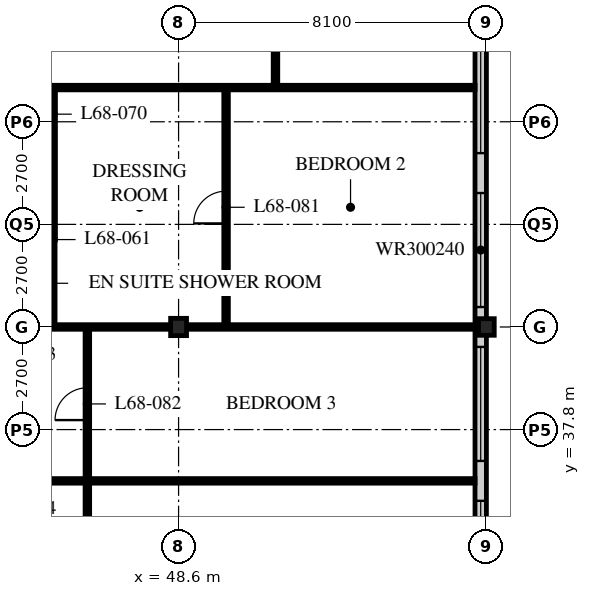
"""IFC4 building model, lengths in metres.
Left out: names, types, materials, properties, quantities, classifications, styles, units other than length and angle.
Written with IfcOpenShell. Run it as: python <this file> out.ifc"""

import sys

from ifc_helpers import new_model, si_unit, direction, frame, frame_2d, origin, origin_2d, place, context, subcontext, project, spatial, rectangle, i_section, extrude, element, fill, save


model = new_model("IFC4")
c1 = context("Model", 3, precision=1e-05, world=origin(), true_north=direction((0.0, 1.0)))
c2 = subcontext(c1, "Body", "Model", "MODEL_VIEW")
j1 = project(units=[si_unit("LENGTHUNIT", "METRE"), si_unit("PLANEANGLEUNIT", "RADIAN")], contexts=[c1])
p1 = place(None, origin())
s1 = spatial("IfcSite", under=j1, at=p1, CompositionType="ELEMENT")
p2 = place(p1, origin())
s2 = spatial("IfcBuilding", under=s1, at=p2, CompositionType="ELEMENT")
p3 = place(p2, frame((0.0, 0.0, 265.8)))
s3 = spatial("IfcBuildingStorey", under=s2, at=p3, CompositionType="ELEMENT", Elevation=265.8)
p4 = place(p3, frame((48.6, 40.5, 0.0), z_axis=(0.0, 0.0, 1.0), x_axis=(1.0, 0.0, 0.0)))
e1 = element("IfcColumn", 1, at=p4, inside=s3, PredefinedType="COLUMN", context=c2, shape_type="SweptSolid", body=[
    extrude(i_section(OverallWidth=0.418, OverallDepth=0.456, WebThickness=0.042, FlangeThickness=0.067, FilletRadius=0.015, at=origin_2d()), origin(), (0.0, 0.0, 1.0), 3.9),
])
p5 = place(p3, frame((56.7, 40.5, 0.0), z_axis=(0.0, 0.0, 1.0), x_axis=(1.0, 0.0, 0.0)))
e2 = element("IfcColumn", 2, at=p5, inside=s3, PredefinedType="COLUMN", context=c2, shape_type="SweptSolid", body=[
    extrude(i_section(OverallWidth=0.412, OverallDepth=0.437, WebThickness=0.036, FlangeThickness=0.058, FilletRadius=0.015, at=origin_2d()), origin(), (0.0, 0.0, 1.0), 3.9),
])
p6 = place(p3, frame((56.55, 24.6, 0.0), z_axis=(0.0, 0.0, 1.0), x_axis=(0.0, 1.0, 0.0)))
e3 = element("IfcWall", 3, at=p6, inside=s3, PredefinedType="SOLIDWALL", context=c2, shape_type="SweptSolid", body=[
    extrude(rectangle(XDim=32.1, YDim=0.3, at=frame_2d((16.05, 0.0))), origin(), (0.0, 0.0, 1.0), 3.69),
])
p7 = place(p6, frame((0.225, 0.0, 0.6)))
e4 = element("IfcOpeningElement", 4, at=p7, cuts=e3, PredefinedType="OPENING", context=c2, shape_type="SweptSolid", body=[
    extrude(rectangle(XDim=3.0, YDim=2.4, at=frame_2d((1.5, 1.2))), frame((0.0, 0.16, 0.0), z_axis=(0.0, -1.0, 0.0), x_axis=(1.0, 0.0, 0.0)), (0.0, 0.0, 1.0), 0.32),
])
p8 = place(p6, frame((4.275, 0.0, 0.6)))
e5 = element("IfcOpeningElement", 5, at=p8, cuts=e3, PredefinedType="OPENING", context=c2, shape_type="SweptSolid", body=[
    extrude(rectangle(XDim=3.0, YDim=2.4, at=frame_2d((1.5, 1.2))), frame((0.0, 0.16, 0.0), z_axis=(0.0, -1.0, 0.0), x_axis=(1.0, 0.0, 0.0)), (0.0, 0.0, 1.0), 0.32),
])
p9 = place(p6, frame((8.325, 0.0, 0.6)))
e6 = element("IfcOpeningElement", 6, at=p9, cuts=e3, PredefinedType="OPENING", context=c2, shape_type="SweptSolid", body=[
    extrude(rectangle(XDim=3.0, YDim=2.4, at=frame_2d((1.5, 1.2))), frame((0.0, 0.16, 0.0), z_axis=(0.0, -1.0, 0.0), x_axis=(1.0, 0.0, 0.0)), (0.0, 0.0, 1.0), 0.32),
])
p10 = place(p6, frame((12.375, 0.0, 0.6)))
e7 = element("IfcOpeningElement", 7, at=p10, cuts=e3, PredefinedType="OPENING", context=c2, shape_type="SweptSolid", body=[
    extrude(rectangle(XDim=3.0, YDim=2.4, at=frame_2d((1.5, 1.2))), frame((0.0, 0.16, 0.0), z_axis=(0.0, -1.0, 0.0), x_axis=(1.0, 0.0, 0.0)), (0.0, 0.0, 1.0), 0.32),
])
p11 = place(p6, frame((16.425, 0.0, 0.6)))
e8 = element("IfcOpeningElement", 8, at=p11, cuts=e3, PredefinedType="OPENING", context=c2, shape_type="SweptSolid", body=[
    extrude(rectangle(XDim=3.0, YDim=2.4, at=frame_2d((1.5, 1.2))), frame((0.0, 0.16, 0.0), z_axis=(0.0, -1.0, 0.0), x_axis=(1.0, 0.0, 0.0)), (0.0, 0.0, 1.0), 0.32),
])
p12 = place(p6, frame((20.475, 0.0, 0.6)))
e9 = element("IfcOpeningElement", 9, at=p12, cuts=e3, PredefinedType="OPENING", context=c2, shape_type="SweptSolid", body=[
    extrude(rectangle(XDim=3.0, YDim=2.4, at=frame_2d((1.5, 1.2))), frame((0.0, 0.16, 0.0), z_axis=(0.0, -1.0, 0.0), x_axis=(1.0, 0.0, 0.0)), (0.0, 0.0, 1.0), 0.32),
])
p13 = place(p6, frame((24.525, 0.0, 0.6)))
e10 = element("IfcOpeningElement", 10, at=p13, cuts=e3, PredefinedType="OPENING", context=c2, shape_type="SweptSolid", body=[
    extrude(rectangle(XDim=3.0, YDim=2.4, at=frame_2d((1.5, 1.2))), frame((0.0, 0.16, 0.0), z_axis=(0.0, -1.0, 0.0), x_axis=(1.0, 0.0, 0.0)), (0.0, 0.0, 1.0), 0.32),
])
p14 = place(p6, frame((28.575, 0.0, 0.6)))
e11 = element("IfcOpeningElement", 11, at=p14, cuts=e3, PredefinedType="OPENING", context=c2, shape_type="SweptSolid", body=[
    extrude(rectangle(XDim=3.0, YDim=2.4, at=frame_2d((1.5, 1.2))), frame((0.0, 0.16, 0.0), z_axis=(0.0, -1.0, 0.0), x_axis=(1.0, 0.0, 0.0)), (0.0, 0.0, 1.0), 0.32),
])
p15 = place(p3, frame((42.9, 46.8, 0.0), z_axis=(0.0, 0.0, 1.0), x_axis=(1.0, 0.0, 0.0)))
e12 = element("IfcWall", 12, at=p15, inside=s3, PredefinedType="PARTITIONING", context=c2, shape_type="SweptSolid", body=[
    extrude(rectangle(XDim=13.5, YDim=0.12, at=frame_2d((6.75, 0.0))), origin(), (0.0, 0.0, 1.0), 3.69),
])
p16 = place(p3, frame((42.9, 42.8, 0.0), z_axis=(0.0, 0.0, 1.0), x_axis=(1.0, 0.0, 0.0)))
e13 = element("IfcWall", 13, at=p16, inside=s3, PredefinedType="PARTITIONING", context=c2, shape_type="SweptSolid", body=[
    extrude(rectangle(XDim=2.4, YDim=0.1, at=frame_2d((1.2, 0.0))), origin(), (0.0, 0.0, 1.0), 3.69),
])
p17 = place(p16, frame((0.8, 0.0, 0.0)))
e14 = element("IfcOpeningElement", 14, at=p17, cuts=e13, PredefinedType="OPENING", context=c2, shape_type="SweptSolid", body=[
    extrude(rectangle(XDim=0.8, YDim=2.1, at=frame_2d((0.4, 1.05))), frame((0.0, 0.06, 0.0), z_axis=(0.0, -1.0, 0.0), x_axis=(1.0, 0.0, 0.0)), (0.0, 0.0, 1.0), 0.12),
])
p18 = place(p3, frame((45.3, 42.8, 0.0), z_axis=(0.0, 0.0, 1.0), x_axis=(0.0, -1.0, 0.0)))
e15 = element("IfcWall", 15, at=p18, inside=s3, PredefinedType="PARTITIONING", context=c2, shape_type="SweptSolid", body=[
    extrude(rectangle(XDim=2.3, YDim=0.1, at=frame_2d((1.15, 0.0))), origin(), (0.0, 0.0, 1.0), 3.69),
])
p19 = place(p3, frame((42.9, 40.5, 0.0), z_axis=(0.0, 0.0, 1.0), x_axis=(1.0, 0.0, 0.0)))
e16 = element("IfcWall", 16, at=p19, inside=s3, PredefinedType="PARTITIONING", context=c2, shape_type="SweptSolid", body=[
    extrude(rectangle(XDim=13.5, YDim=0.12, at=frame_2d((6.75, 0.0))), origin(), (0.0, 0.0, 1.0), 3.078),
])
p20 = place(p3, frame((42.9, 36.45, 0.0), z_axis=(0.0, 0.0, 1.0), x_axis=(1.0, 0.0, 0.0)))
e17 = element("IfcWall", 17, at=p20, inside=s3, PredefinedType="PARTITIONING", context=c2, shape_type="SweptSolid", body=[
    extrude(rectangle(XDim=13.5, YDim=0.12, at=frame_2d((6.75, 0.0))), origin(), (0.0, 0.0, 1.0), 3.69),
])
p21 = place(p3, frame((45.3, 46.8, 0.0), z_axis=(0.0, 0.0, 1.0), x_axis=(0.0, -1.0, 0.0)))
e18 = element("IfcWall", 18, at=p21, inside=s3, PredefinedType="PARTITIONING", context=c2, shape_type="SweptSolid", body=[
    extrude(rectangle(XDim=4.01, YDim=0.12, at=frame_2d((2.005, 0.0))), origin(), (0.0, 0.0, 1.0), 3.69),
])
p22 = place(p21, frame((0.275, 0.0, 0.0)))
e19 = element("IfcOpeningElement", 19, at=p22, cuts=e18, PredefinedType="OPENING", context=c2, shape_type="SweptSolid", body=[
    extrude(rectangle(XDim=0.85, YDim=2.1, at=frame_2d((0.425, 1.05))), frame((0.0, 0.07, 0.0), z_axis=(0.0, -1.0, 0.0), x_axis=(1.0, 0.0, 0.0)), (0.0, 0.0, 1.0), 0.14),
])
p23 = place(p3, frame((46.2, 28.35, 0.0), z_axis=(0.0, 0.0, 1.0), x_axis=(0.0, 1.0, 0.0)))
e20 = element("IfcWall", 20, at=p23, inside=s3, PredefinedType="PARTITIONING", context=c2, shape_type="SweptSolid", body=[
    extrude(rectangle(XDim=12.15, YDim=0.12, at=frame_2d((6.075, 0.0))), origin(), (0.0, 0.0, 1.0), 3.69),
])
p24 = place(p23, frame((1.6, 0.0, 0.0)))
e21 = element("IfcOpeningElement", 21, at=p24, cuts=e20, PredefinedType="OPENING", context=c2, shape_type="SweptSolid", body=[
    extrude(rectangle(XDim=0.85, YDim=2.1, at=frame_2d((0.425, 1.05))), frame((0.0, 0.07, 0.0), z_axis=(0.0, -1.0, 0.0), x_axis=(1.0, 0.0, 0.0)), (0.0, 0.0, 1.0), 0.14),
])
p25 = place(p23, frame((9.7, 0.0, 0.0)))
e22 = element("IfcOpeningElement", 22, at=p25, cuts=e20, PredefinedType="OPENING", context=c2, shape_type="SweptSolid", body=[
    extrude(rectangle(XDim=0.85, YDim=2.1, at=frame_2d((0.425, 1.05))), frame((0.0, 0.07, 0.0), z_axis=(0.0, -1.0, 0.0), x_axis=(1.0, 0.0, 0.0)), (0.0, 0.0, 1.0), 0.14),
])
p26 = place(p23, frame((5.65, 0.0, 0.0)))
e23 = element("IfcOpeningElement", 23, at=p26, cuts=e20, PredefinedType="OPENING", context=c2, shape_type="SweptSolid", body=[
    extrude(rectangle(XDim=0.85, YDim=2.1, at=frame_2d((0.425, 1.05))), frame((0.0, 0.07, 0.0), z_axis=(0.0, -1.0, 0.0), x_axis=(1.0, 0.0, 0.0)), (0.0, 0.0, 1.0), 0.14),
])
p27 = place(p3, frame((51.15, 46.8, 0.0), z_axis=(0.0, 0.0, 1.0), x_axis=(0.0, 1.0, 0.0)))
e24 = element("IfcWall", 24, at=p27, inside=s3, PredefinedType="PARTITIONING", context=c2, shape_type="SweptSolid", body=[
    extrude(rectangle(XDim=7.8, YDim=0.12, at=frame_2d((3.9, 0.0))), origin(), (0.0, 0.0, 1.0), 3.69),
])
p28 = place(p27, frame((3.475, 0.0, 0.0)))
e25 = element("IfcOpeningElement", 25, at=p28, cuts=e24, PredefinedType="OPENING", context=c2, shape_type="SweptSolid", body=[
    extrude(rectangle(XDim=0.85, YDim=2.1, at=frame_2d((0.425, 1.05))), frame((0.0, 0.07, 0.0), z_axis=(0.0, -1.0, 0.0), x_axis=(1.0, 0.0, 0.0)), (0.0, 0.0, 1.0), 0.14),
])
p29 = place(p3, frame((49.85, 40.5, 0.0), z_axis=(0.0, 0.0, 1.0), x_axis=(0.0, 1.0, 0.0)))
e26 = element("IfcWall", 26, at=p29, inside=s3, PredefinedType="PARTITIONING", context=c2, shape_type="SweptSolid", body=[
    extrude(rectangle(XDim=6.3, YDim=0.12, at=frame_2d((3.15, 0.0))), origin(), (0.0, 0.0, 1.0), 3.69),
])
p30 = place(p29, frame((2.725, 0.0, 0.0)))
e27 = element("IfcOpeningElement", 27, at=p30, cuts=e26, PredefinedType="OPENING", context=c2, shape_type="SweptSolid", body=[
    extrude(rectangle(XDim=0.85, YDim=2.1, at=frame_2d((0.425, 1.05))), frame((0.0, 0.07, 0.0), z_axis=(0.0, -1.0, 0.0), x_axis=(1.0, 0.0, 0.0)), (0.0, 0.0, 1.0), 0.14),
])
p31 = place(p9, origin())
e28 = element("IfcWindow", 28, at=p31, inside=s3, PartitioningType="SINGLE_PANEL", PredefinedType="WINDOW", context=c2, shape_type="SweptSolid", body=[
    extrude(rectangle(XDim=3.0, YDim=2.4, at=frame_2d((1.5, 1.2))), frame((0.0, 0.03, 0.0), z_axis=(0.0, -1.0, 0.0), x_axis=(1.0, 0.0, 0.0)), (0.0, 0.0, 1.0), 0.06),
])
fill(e6, e28)
p32 = place(p10, origin())
e29 = element("IfcWindow", 29, at=p32, inside=s3, PartitioningType="SINGLE_PANEL", PredefinedType="WINDOW", context=c2, shape_type="SweptSolid", body=[
    extrude(rectangle(XDim=3.0, YDim=2.4, at=frame_2d((1.5, 1.2))), frame((0.0, 0.03, 0.0), z_axis=(0.0, -1.0, 0.0), x_axis=(1.0, 0.0, 0.0)), (0.0, 0.0, 1.0), 0.06),
])
fill(e7, e29)
p33 = place(p11, origin())
e30 = element("IfcWindow", 30, at=p33, inside=s3, PartitioningType="SINGLE_PANEL", PredefinedType="WINDOW", context=c2, shape_type="SweptSolid", body=[
    extrude(rectangle(XDim=3.0, YDim=2.4, at=frame_2d((1.5, 1.2))), frame((0.0, 0.03, 0.0), z_axis=(0.0, -1.0, 0.0), x_axis=(1.0, 0.0, 0.0)), (0.0, 0.0, 1.0), 0.06),
])
fill(e8, e30)
p34 = place(p12, origin())
e31 = element("IfcWindow", 31, at=p34, inside=s3, PartitioningType="SINGLE_PANEL", PredefinedType="WINDOW", context=c2, shape_type="SweptSolid", body=[
    extrude(rectangle(XDim=3.0, YDim=2.4, at=frame_2d((1.5, 1.2))), frame((0.0, 0.03, 0.0), z_axis=(0.0, -1.0, 0.0), x_axis=(1.0, 0.0, 0.0)), (0.0, 0.0, 1.0), 0.06),
])
fill(e9, e31)
p35 = place(p22, origin())
e32 = element("IfcDoor", 32, at=p35, inside=s3, OperationType="SINGLE_SWING_LEFT", PredefinedType="DOOR", context=c2, shape_type="SweptSolid", body=[
    extrude(rectangle(XDim=0.85, YDim=2.1, at=frame_2d((0.425, 1.05))), frame((0.0, 0.025, 0.0), z_axis=(0.0, -1.0, 0.0), x_axis=(1.0, 0.0, 0.0)), (0.0, 0.0, 1.0), 0.05),
])
fill(e19, e32)
p36 = place(p30, origin())
e33 = element("IfcDoor", 33, at=p36, inside=s3, OperationType="SINGLE_SWING_LEFT", PredefinedType="DOOR", context=c2, shape_type="SweptSolid", body=[
    extrude(rectangle(XDim=0.85, YDim=2.1, at=frame_2d((0.425, 1.05))), frame((0.0, 0.025, 0.0), z_axis=(0.0, -1.0, 0.0), x_axis=(1.0, 0.0, 0.0)), (0.0, 0.0, 1.0), 0.05),
])
fill(e27, e33)
p37 = place(p25, origin())
e34 = element("IfcDoor", 34, at=p37, inside=s3, OperationType="SINGLE_SWING_LEFT", PredefinedType="DOOR", context=c2, shape_type="SweptSolid", body=[
    extrude(rectangle(XDim=0.85, YDim=2.1, at=frame_2d((0.425, 1.05))), frame((0.0, 0.025, 0.0), z_axis=(0.0, -1.0, 0.0), x_axis=(1.0, 0.0, 0.0)), (0.0, 0.0, 1.0), 0.05),
])
fill(e22, e34)
save(model, sys.argv[1])
